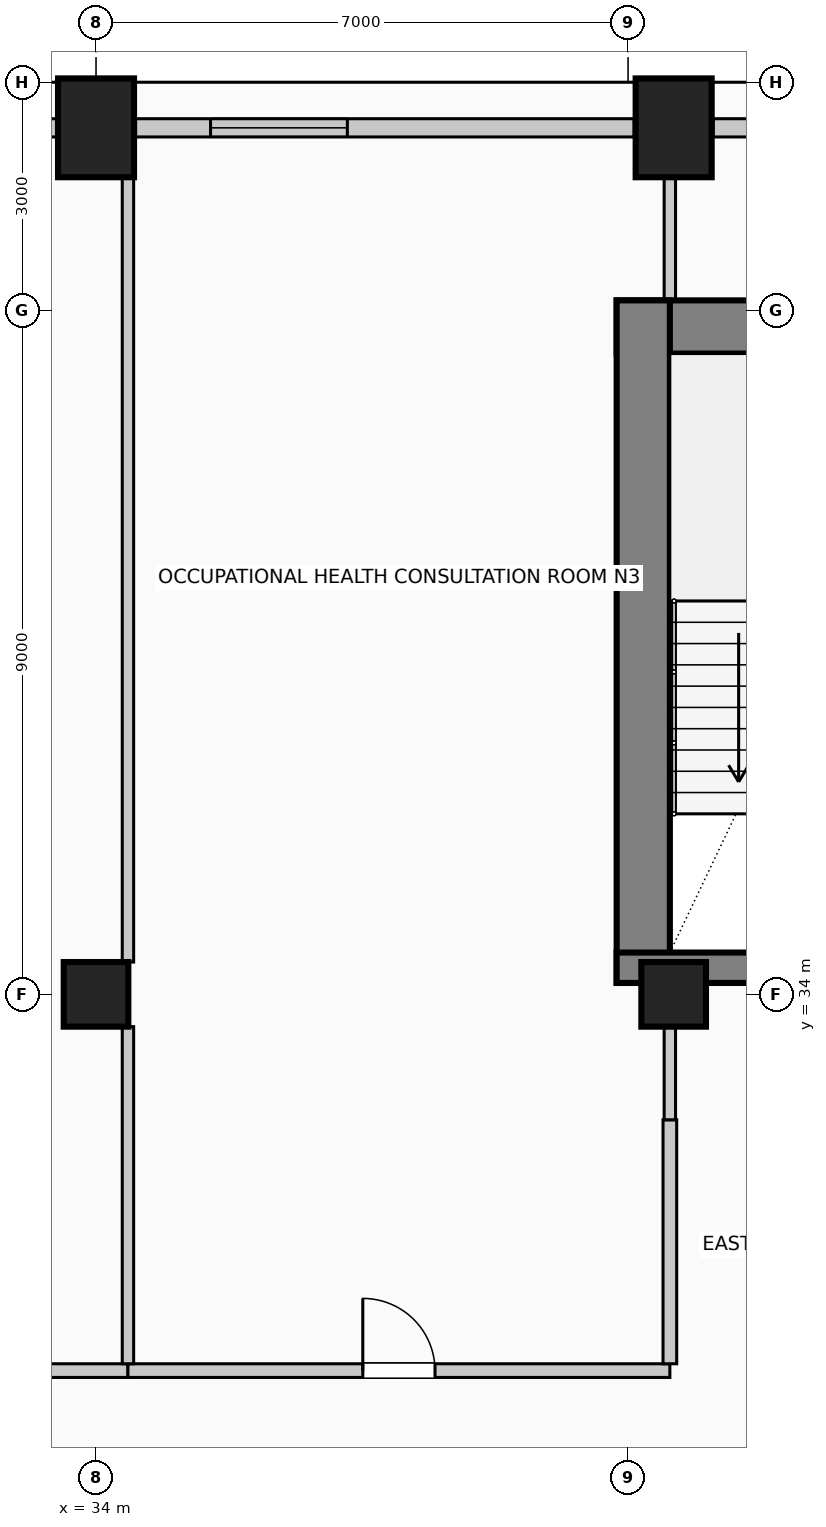
"""IFC4 building model, lengths in metres.
Left out: names, types, materials, properties, quantities, classifications, styles, units other than length and angle.
Written with IfcOpenShell. Run it as: python <this file> out.ifc"""

import sys

from ifc_helpers import new_model, si_unit, direction, frame, frame_2d, origin, origin_2d, place, context, subcontext, project, spatial, rectangle, circle, extrude, element, fill, save


model = new_model("IFC4")
c1 = context("Model", 3, precision=1e-05, world=origin(), true_north=direction((0.0, 1.0)))
c2 = subcontext(c1, "Body", "Model", "MODEL_VIEW")
j1 = project(units=[si_unit("LENGTHUNIT", "METRE"), si_unit("PLANEANGLEUNIT", "RADIAN")], contexts=[c1])
p1 = place(None, origin())
s1 = spatial("IfcSite", under=j1, at=p1, CompositionType="ELEMENT")
p2 = place(p1, origin())
s2 = spatial("IfcBuilding", under=s1, at=p2, CompositionType="ELEMENT")
p3 = place(p2, frame((0.0, 0.0, 264.6)))
s3 = spatial("IfcBuildingStorey", under=s2, at=p3, CompositionType="ELEMENT", Elevation=264.6)
p4 = place(p3, frame((40.85, 42.78, 0.0), z_axis=(0.0, 0.0, 1.0), x_axis=(1.0, 0.0, 0.0)))
e1 = element("IfcWall", 1, at=p4, inside=s3, PredefinedType="SHEAR", context=c2, shape_type="SweptSolid", body=[
    extrude(rectangle(XDim=14.3, YDim=0.7, at=frame_2d((7.15, 0.0))), origin(), (0.0, 0.0, 1.0), 4.0),
])
p5 = place(p3, frame((41.2, 34.15, 0.0), z_axis=(0.0, 0.0, 1.0), x_axis=(0.0, 1.0, 0.0)))
e2 = element("IfcWall", 2, at=p5, inside=s3, PredefinedType="SHEAR", context=c2, shape_type="SweptSolid", body=[
    extrude(rectangle(XDim=8.98, YDim=0.7, at=frame_2d((4.49, 0.0))), origin(), (0.0, 0.0, 1.0), 4.0),
])
p6 = place(p3, frame((40.85, 34.35, 0.0), z_axis=(0.0, 0.0, 1.0), x_axis=(1.0, 0.0, 0.0)))
e3 = element("IfcWall", 3, at=p6, inside=s3, PredefinedType="SHEAR", context=c2, shape_type="SweptSolid", body=[
    extrude(rectangle(XDim=4.86, YDim=0.4, at=frame_2d((2.43, 0.0))), origin(), (0.0, 0.0, 1.0), 4.0),
])
p7 = place(p6, frame((2.4, 0.0, 0.0)))
e4 = element("IfcOpeningElement", 4, at=p7, cuts=e3, PredefinedType="OPENING", context=c2, shape_type="SweptSolid", body=[
    extrude(rectangle(XDim=1.15, YDim=2.2, at=frame_2d((0.575, 1.1))), frame((0.0, 0.21, 0.0), z_axis=(0.0, -1.0, 0.0), x_axis=(1.0, 0.0, 0.0)), (0.0, 0.0, 1.0), 0.42),
])
for number, where, z_axis, x_axis in (
    (5, (34.0, 45.4, 0.0), (0.0, 0.0, 1.0), (1.0, 0.0, 0.0)),
    (6, (41.6, 45.4, 0.0), (0.0, 0.0, 1.0), (1.0, 0.0, 0.0)),
):
    element("IfcColumn", number, at=place(p3, frame(where, z_axis=z_axis, x_axis=x_axis)), inside=s3, PredefinedType="COLUMN", context=c2, shape_type="SweptSolid", body=[
        extrude(rectangle(XDim=1.0, YDim=1.3, at=origin_2d()), origin(), (0.0, 0.0, 1.0), 4.0),
    ])
for number, where, z_axis, x_axis in (
    (7, (41.6, 34.0, 0.0), (0.0, 0.0, 1.0), (1.0, 0.0, 0.0)),
    (8, (34.0, 34.0, 0.0), (0.0, 0.0, 1.0), (1.0, 0.0, 0.0)),
):
    element("IfcColumn", number, at=place(p3, frame(where, z_axis=z_axis, x_axis=x_axis)), inside=s3, PredefinedType="COLUMN", context=c2, shape_type="SweptSolid", body=[
        extrude(circle(Radius=0.425, at=origin_2d()), origin(), (0.0, 0.0, 1.0), 4.0),
    ])
p8 = place(p3, frame((29.395, 45.4, 0.0), z_axis=(0.0, 0.0, 1.0), x_axis=(1.0, 0.0, 0.0)))
e9 = element("IfcWall", 9, at=p8, inside=s3, PredefinedType="SOLIDWALL", context=c2, shape_type="SweptSolid", body=[
    extrude(rectangle(XDim=4.085, YDim=0.24, at=frame_2d((2.042, 0.0))), origin(), (0.0, 0.0, 1.0), 3.0),
])
p9 = place(p3, frame((34.52, 45.4, 0.0), z_axis=(0.0, 0.0, 1.0), x_axis=(1.0, 0.0, 0.0)))
e10 = element("IfcWall", 10, at=p9, inside=s3, PredefinedType="SOLIDWALL", context=c2, shape_type="SweptSolid", body=[
    extrude(rectangle(XDim=6.56, YDim=0.24, at=frame_2d((3.28, 0.0))), origin(), (0.0, 0.0, 1.0), 3.0),
])
p10 = place(p9, frame((0.987, 0.0, 0.42)))
e11 = element("IfcOpeningElement", 11, at=p10, cuts=e10, PredefinedType="OPENING", context=c2, shape_type="SweptSolid", body=[
    extrude(rectangle(XDim=1.8, YDim=2.2, at=frame_2d((0.9, 1.1))), frame((0.0, 0.13, 0.0), z_axis=(0.0, -1.0, 0.0), x_axis=(1.0, 0.0, 0.0)), (0.0, 0.0, 1.0), 0.26),
])
p11 = place(p3, frame((42.12, 45.4, 0.0), z_axis=(0.0, 0.0, 1.0), x_axis=(1.0, 0.0, 0.0)))
e12 = element("IfcWall", 12, at=p11, inside=s3, PredefinedType="SOLIDWALL", context=c2, shape_type="SweptSolid", body=[
    extrude(rectangle(XDim=1.485, YDim=0.24, at=frame_2d((0.742, 0.0))), origin(), (0.0, 0.0, 1.0), 3.0),
])
p12 = place(p3, frame((30.23, 29.05, 0.0), z_axis=(0.0, 0.0, 1.0), x_axis=(1.0, 0.0, 0.0)))
e13 = element("IfcWall", 13, at=p12, inside=s3, PredefinedType="PARTITIONING", context=c2, shape_type="SweptSolid", body=[
    extrude(rectangle(XDim=4.19, YDim=0.18, at=frame_2d((2.095, 0.0))), origin(), (0.0, 0.0, 1.0), 3.75),
])
p13 = place(p12, frame((1.57, 0.0, 0.0)))
e14 = element("IfcOpeningElement", 14, at=p13, cuts=e13, PredefinedType="OPENING", context=c2, shape_type="SweptSolid", body=[
    extrude(rectangle(XDim=1.05, YDim=2.15, at=frame_2d((0.525, 1.075))), frame((0.0, 0.1, 0.0), z_axis=(0.0, -1.0, 0.0), x_axis=(1.0, 0.0, 0.0)), (0.0, 0.0, 1.0), 0.2),
])
p14 = place(p3, frame((34.42, 29.05, 0.0), z_axis=(0.0, 0.0, 1.0), x_axis=(1.0, 0.0, 0.0)))
e15 = element("IfcWall", 15, at=p14, inside=s3, PredefinedType="PARTITIONING", context=c2, shape_type="SweptSolid", body=[
    extrude(rectangle(XDim=7.13, YDim=0.18, at=frame_2d((3.565, 0.0))), origin(), (0.0, 0.0, 1.0), 3.75),
])
p15 = place(p14, frame((3.09, 0.0, 0.0)))
e16 = element("IfcOpeningElement", 16, at=p15, cuts=e15, PredefinedType="OPENING", context=c2, shape_type="SweptSolid", body=[
    extrude(rectangle(XDim=0.95, YDim=2.15, at=frame_2d((0.475, 1.075))), frame((0.0, 0.1, 0.0), z_axis=(0.0, -1.0, 0.0), x_axis=(1.0, 0.0, 0.0)), (0.0, 0.0, 1.0), 0.2),
])
p16 = place(p3, frame((34.42, 29.14, 0.0), z_axis=(0.0, 0.0, 1.0), x_axis=(0.0, 1.0, 0.0)))
e17 = element("IfcWall", 17, at=p16, inside=s3, PredefinedType="PARTITIONING", context=c2, shape_type="SweptSolid", body=[
    extrude(rectangle(XDim=4.435, YDim=0.15, at=frame_2d((2.218, 0.0))), origin(), (0.0, 0.0, 1.0), 3.75),
])
p17 = place(p3, frame((34.42, 34.425, 0.0), z_axis=(0.0, 0.0, 1.0), x_axis=(0.0, 1.0, 0.0)))
e18 = element("IfcWall", 18, at=p17, inside=s3, PredefinedType="PARTITIONING", context=c2, shape_type="SweptSolid", body=[
    extrude(rectangle(XDim=10.325, YDim=0.15, at=frame_2d((5.163, 0.0))), origin(), (0.0, 0.0, 1.0), 3.75),
])
p18 = place(p3, frame((41.55, 29.14, 0.0), z_axis=(0.0, 0.0, 1.0), x_axis=(0.0, 1.0, 0.0)))
e19 = element("IfcWall", 19, at=p18, inside=s3, PredefinedType="PARTITIONING", context=c2, shape_type="SweptSolid", body=[
    extrude(rectangle(XDim=3.21, YDim=0.18, at=frame_2d((1.605, 0.0))), origin(), (0.0, 0.0, 1.0), 3.195),
])
p19 = place(p3, frame((41.55, 32.35, 0.0), z_axis=(0.0, 0.0, 1.0), x_axis=(0.0, 1.0, 0.0)))
e20 = element("IfcWall", 20, at=p19, inside=s3, PredefinedType="PARTITIONING", context=c2, shape_type="SweptSolid", body=[
    extrude(rectangle(XDim=1.225, YDim=0.15, at=frame_2d((0.612, 0.0))), origin(), (0.0, 0.0, 1.0), 3.195),
])
p20 = place(p3, frame((41.55, 43.13, 0.0), z_axis=(0.0, 0.0, 1.0), x_axis=(0.0, 1.0, 0.0)))
e21 = element("IfcWall", 21, at=p20, inside=s3, PredefinedType="PARTITIONING", context=c2, shape_type="SweptSolid", body=[
    extrude(rectangle(XDim=1.62, YDim=0.15, at=frame_2d((0.81, 0.0))), origin(), (0.0, 0.0, 1.0), 3.75),
])
p21 = place(p10, origin())
e22 = element("IfcWindow", 22, at=p21, inside=s3, PartitioningType="SINGLE_PANEL", PredefinedType="WINDOW", context=c2, shape_type="SweptSolid", body=[
    extrude(rectangle(XDim=1.8, YDim=2.2, at=frame_2d((0.9, 1.1))), frame((0.0, 0.03, 0.0), z_axis=(0.0, -1.0, 0.0), x_axis=(1.0, 0.0, 0.0)), (0.0, 0.0, 1.0), 0.06),
])
fill(e11, e22)
p22 = place(p15, origin())
e23 = element("IfcDoor", 23, at=p22, inside=s3, OperationType="SINGLE_SWING_LEFT", PredefinedType="DOOR", context=c2, shape_type="SweptSolid", body=[
    extrude(rectangle(XDim=0.95, YDim=2.15, at=frame_2d((0.475, 1.075))), frame((0.0, 0.025, 0.0), z_axis=(0.0, -1.0, 0.0), x_axis=(1.0, 0.0, 0.0)), (0.0, 0.0, 1.0), 0.05),
])
fill(e16, e23)
save(model, sys.argv[1])
